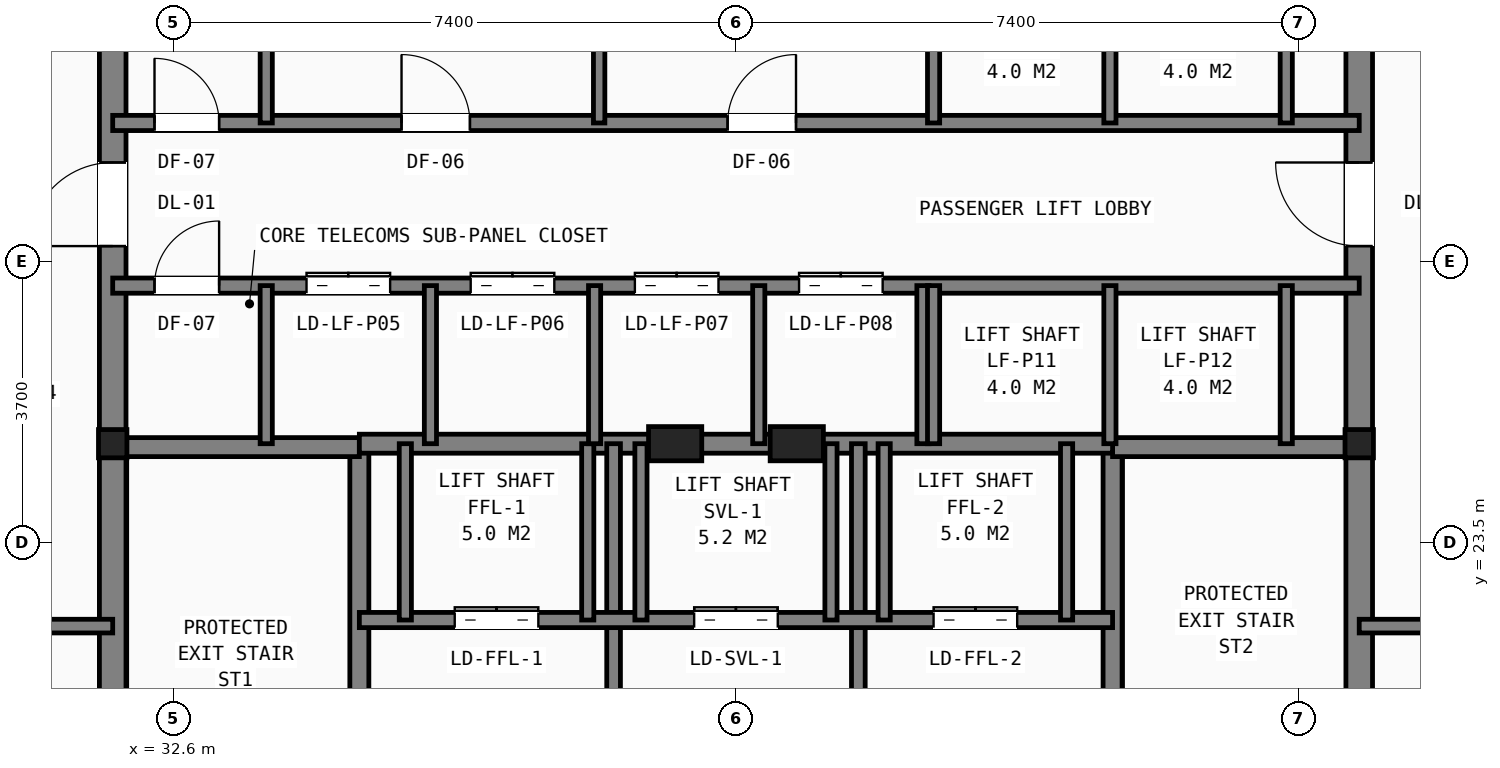
"""IFC4 building model, lengths in metres.
Left out: names, types, materials, properties, quantities, classifications, styles, units other than length and angle.
Written with IfcOpenShell. Run it as: python <this file> out.ifc"""

import sys

from ifc_helpers import new_model, si_unit, direction, frame, frame_2d, origin, origin_2d, place, context, subcontext, project, spatial, rectangle, i_section, extrude, element, fill, save


model = new_model("IFC4")
c1 = context("Model", 3, precision=1e-05, world=origin(), true_north=direction((0.0, 1.0)))
c2 = subcontext(c1, "Body", "Model", "MODEL_VIEW")
j1 = project(units=[si_unit("LENGTHUNIT", "METRE"), si_unit("PLANEANGLEUNIT", "RADIAN")], contexts=[c1])
p1 = place(None, origin())
s1 = spatial("IfcSite", under=j1, at=p1, CompositionType="ELEMENT")
p2 = place(p1, origin())
s2 = spatial("IfcBuilding", under=s1, at=p2, CompositionType="ELEMENT")
p3 = place(p2, frame((0.0, 0.0, 157.4)))
s3 = spatial("IfcBuildingStorey", under=s2, at=p3, CompositionType="ELEMENT", Elevation=157.4)
for number, where, z_axis, x_axis in (
    (1, (31.8, 24.8, 0.0), (0.0, 0.0, 1.0), (1.0, 0.0, 0.0)),
    (2, (48.2, 24.8, 0.0), (0.0, 0.0, 1.0), (1.0, 0.0, 0.0)),
):
    element("IfcColumn", number, at=place(p3, frame(where, z_axis=z_axis, x_axis=x_axis)), inside=s3, PredefinedType="COLUMN", context=c2, shape_type="SweptSolid", body=[
        extrude(i_section(OverallWidth=0.374, OverallDepth=0.372, WebThickness=0.016, FlangeThickness=0.026, at=origin_2d()), origin(), (0.0, 0.0, 1.0), 4.6),
    ])
for number, where, z_axis, x_axis in (
    (3, (39.2, 24.8, 0.0), (0.0, 0.0, 1.0), (1.0, 0.0, 0.0)),
    (4, (40.8, 24.8, 0.0), (0.0, 0.0, 1.0), (1.0, 0.0, 0.0)),
):
    element("IfcColumn", number, at=place(p3, frame(where, z_axis=z_axis, x_axis=x_axis)), inside=s3, PredefinedType="PILASTER", context=c2, shape_type="SweptSolid", body=[
        extrude(rectangle(XDim=0.7, YDim=0.45, at=origin_2d()), origin(), (0.0, 0.0, 1.0), 4.6),
    ])
p4 = place(p3, frame((31.8, 16.4, 0.0), z_axis=(0.0, 0.0, 1.0), x_axis=(0.0, 1.0, 0.0)))
e5 = element("IfcWall", 5, at=p4, inside=s3, PredefinedType="SHEAR", context=c2, shape_type="SweptSolid", body=[
    extrude(rectangle(XDim=14.8, YDim=0.35, at=frame_2d((7.4, 0.0))), origin(), (0.0, 0.0, 1.0), 4.36),
])
p5 = place(p4, frame((11.0, 0.0, 0.0)))
e6 = element("IfcOpeningElement", 6, at=p5, cuts=e5, PredefinedType="OPENING", context=c2, shape_type="SweptSolid", body=[
    extrude(rectangle(XDim=1.1, YDim=2.15, at=frame_2d((0.55, 1.075))), frame((0.0, 0.185, 0.0), z_axis=(0.0, -1.0, 0.0), x_axis=(1.0, 0.0, 0.0)), (0.0, 0.0, 1.0), 0.37),
])
p6 = place(p4, frame((0.45, 0.0, 0.0)))
e7 = element("IfcOpeningElement", 7, at=p6, cuts=e5, PredefinedType="OPENING", context=c2, shape_type="SweptSolid", body=[
    extrude(rectangle(XDim=0.95, YDim=2.1, at=frame_2d((0.475, 1.05))), frame((0.0, 0.185, 0.0), z_axis=(0.0, -1.0, 0.0), x_axis=(1.0, 0.0, 0.0)), (0.0, 0.0, 1.0), 0.37),
])
p7 = place(p3, frame((48.2, 16.4, 0.0), z_axis=(0.0, 0.0, 1.0), x_axis=(0.0, 1.0, 0.0)))
e8 = element("IfcWall", 8, at=p7, inside=s3, PredefinedType="SHEAR", context=c2, shape_type="SweptSolid", body=[
    extrude(rectangle(XDim=14.8, YDim=0.35, at=frame_2d((7.4, 0.0))), origin(), (0.0, 0.0, 1.0), 4.36),
])
p8 = place(p7, frame((11.0, 0.0, 0.0)))
e9 = element("IfcOpeningElement", 9, at=p8, cuts=e8, PredefinedType="OPENING", context=c2, shape_type="SweptSolid", body=[
    extrude(rectangle(XDim=1.1, YDim=2.15, at=frame_2d((0.55, 1.075))), frame((0.0, 0.185, 0.0), z_axis=(0.0, -1.0, 0.0), x_axis=(1.0, 0.0, 0.0)), (0.0, 0.0, 1.0), 0.37),
])
p9 = place(p7, frame((0.45, 0.0, 0.0)))
e10 = element("IfcOpeningElement", 10, at=p9, cuts=e8, PredefinedType="OPENING", context=c2, shape_type="SweptSolid", body=[
    extrude(rectangle(XDim=0.95, YDim=2.1, at=frame_2d((0.475, 1.05))), frame((0.0, 0.185, 0.0), z_axis=(0.0, -1.0, 0.0), x_axis=(1.0, 0.0, 0.0)), (0.0, 0.0, 1.0), 0.37),
])
p10 = place(p3, frame((35.045, 16.4, 0.0), z_axis=(0.0, 0.0, 1.0), x_axis=(0.0, 1.0, 0.0)))
e11 = element("IfcWall", 11, at=p10, inside=s3, PredefinedType="SHEAR", context=c2, shape_type="SweptSolid", body=[
    extrude(rectangle(XDim=8.4, YDim=0.25, at=frame_2d((4.2, 0.0))), origin(), (0.0, 0.0, 1.0), 4.36),
])
p11 = place(p10, frame((0.45, 0.0, 0.0)))
e12 = element("IfcOpeningElement", 12, at=p11, cuts=e11, PredefinedType="OPENING", context=c2, shape_type="SweptSolid", body=[
    extrude(rectangle(XDim=0.95, YDim=2.1, at=frame_2d((0.475, 1.05))), frame((0.0, 0.135, 0.0), z_axis=(0.0, -1.0, 0.0), x_axis=(1.0, 0.0, 0.0)), (0.0, 0.0, 1.0), 0.27),
])
p12 = place(p3, frame((31.8, 24.755, 0.0), z_axis=(0.0, 0.0, 1.0), x_axis=(1.0, 0.0, 0.0)))
e13 = element("IfcWall", 13, at=p12, inside=s3, PredefinedType="SHEAR", context=c2, shape_type="SweptSolid", body=[
    extrude(rectangle(XDim=3.245, YDim=0.25, at=frame_2d((1.623, 0.0))), origin(), (0.0, 0.0, 1.0), 4.36),
])
p13 = place(p3, frame((44.955, 16.4, 0.0), z_axis=(0.0, 0.0, 1.0), x_axis=(0.0, 1.0, 0.0)))
e14 = element("IfcWall", 14, at=p13, inside=s3, PredefinedType="SHEAR", context=c2, shape_type="SweptSolid", body=[
    extrude(rectangle(XDim=8.4, YDim=0.25, at=frame_2d((4.2, 0.0))), origin(), (0.0, 0.0, 1.0), 4.36),
])
p14 = place(p13, frame((0.45, 0.0, 0.0)))
e15 = element("IfcOpeningElement", 15, at=p14, cuts=e14, PredefinedType="OPENING", context=c2, shape_type="SweptSolid", body=[
    extrude(rectangle(XDim=0.95, YDim=2.1, at=frame_2d((0.475, 1.05))), frame((0.0, 0.135, 0.0), z_axis=(0.0, -1.0, 0.0), x_axis=(1.0, 0.0, 0.0)), (0.0, 0.0, 1.0), 0.27),
])
p15 = place(p3, frame((44.955, 24.755, 0.0), z_axis=(0.0, 0.0, 1.0), x_axis=(1.0, 0.0, 0.0)))
e16 = element("IfcWall", 16, at=p15, inside=s3, PredefinedType="SHEAR", context=c2, shape_type="SweptSolid", body=[
    extrude(rectangle(XDim=3.245, YDim=0.25, at=frame_2d((1.623, 0.0))), origin(), (0.0, 0.0, 1.0), 4.36),
])
p16 = place(p3, frame((35.045, 24.8, 0.0), z_axis=(0.0, 0.0, 1.0), x_axis=(1.0, 0.0, 0.0)))
e17 = element("IfcWall", 17, at=p16, inside=s3, PredefinedType="SHEAR", context=c2, shape_type="SweptSolid", body=[
    extrude(rectangle(XDim=9.91, YDim=0.25, at=frame_2d((4.955, 0.0))), origin(), (0.0, 0.0, 1.0), 4.36),
])
p17 = place(p3, frame((38.39, 16.4, 0.0), z_axis=(0.0, 0.0, 1.0), x_axis=(0.0, 1.0, 0.0)))
e18 = element("IfcWall", 18, at=p17, inside=s3, PredefinedType="PARTITIONING", context=c2, shape_type="SweptSolid", body=[
    extrude(rectangle(XDim=8.4, YDim=0.18, at=frame_2d((4.2, 0.0))), origin(), (0.0, 0.0, 1.0), 4.088),
])
p18 = place(p17, frame((3.8, 0.0, 0.0)))
e19 = element("IfcOpeningElement", 19, at=p18, cuts=e18, PredefinedType="OPENING", context=c2, shape_type="SweptSolid", body=[
    extrude(rectangle(XDim=0.95, YDim=2.1, at=frame_2d((0.475, 1.05))), frame((0.0, 0.1, 0.0), z_axis=(0.0, -1.0, 0.0), x_axis=(1.0, 0.0, 0.0)), (0.0, 0.0, 1.0), 0.2),
])
p19 = place(p3, frame((41.61, 16.4, 0.0), z_axis=(0.0, 0.0, 1.0), x_axis=(0.0, 1.0, 0.0)))
e20 = element("IfcWall", 20, at=p19, inside=s3, PredefinedType="PARTITIONING", context=c2, shape_type="SweptSolid", body=[
    extrude(rectangle(XDim=8.4, YDim=0.18, at=frame_2d((4.2, 0.0))), origin(), (0.0, 0.0, 1.0), 4.088),
])
p20 = place(p3, frame((35.045, 22.48, 0.0), z_axis=(0.0, 0.0, 1.0), x_axis=(1.0, 0.0, 0.0)))
e21 = element("IfcWall", 21, at=p20, inside=s3, PredefinedType="SOLIDWALL", context=c2, shape_type="SweptSolid", body=[
    extrude(rectangle(XDim=9.91, YDim=0.2, at=frame_2d((4.955, 0.0))), origin(), (0.0, 0.0, 1.0), 4.36),
])
p21 = place(p20, frame((1.255, 0.0, 0.0)))
e22 = element("IfcOpeningElement", 22, at=p21, cuts=e21, PredefinedType="OPENING", context=c2, shape_type="SweptSolid", body=[
    extrude(rectangle(XDim=1.1, YDim=2.15, at=frame_2d((0.55, 1.075))), frame((0.0, 0.11, 0.0), z_axis=(0.0, -1.0, 0.0), x_axis=(1.0, 0.0, 0.0)), (0.0, 0.0, 1.0), 0.22),
])
p22 = place(p20, frame((7.555, 0.0, 0.0)))
e23 = element("IfcOpeningElement", 23, at=p22, cuts=e21, PredefinedType="OPENING", context=c2, shape_type="SweptSolid", body=[
    extrude(rectangle(XDim=1.1, YDim=2.15, at=frame_2d((0.55, 1.075))), frame((0.0, 0.11, 0.0), z_axis=(0.0, -1.0, 0.0), x_axis=(1.0, 0.0, 0.0)), (0.0, 0.0, 1.0), 0.22),
])
p23 = place(p20, frame((4.405, 0.0, 0.0)))
e24 = element("IfcOpeningElement", 24, at=p23, cuts=e21, PredefinedType="OPENING", context=c2, shape_type="SweptSolid", body=[
    extrude(rectangle(XDim=1.1, YDim=2.15, at=frame_2d((0.55, 1.075))), frame((0.0, 0.11, 0.0), z_axis=(0.0, -1.0, 0.0), x_axis=(1.0, 0.0, 0.0)), (0.0, 0.0, 1.0), 0.22),
])
for number, where, z_axis, x_axis in (
    (25, (35.65, 22.48, 0.0), (0.0, 0.0, 1.0), (0.0, 1.0, 0.0)),
    (26, (38.05, 22.48, 0.0), (0.0, 0.0, 1.0), (0.0, 1.0, 0.0)),
    (27, (41.95, 22.48, 0.0), (0.0, 0.0, 1.0), (0.0, 1.0, 0.0)),
    (28, (44.35, 22.48, 0.0), (0.0, 0.0, 1.0), (0.0, 1.0, 0.0)),
    (29, (38.75, 22.48, 0.0), (0.0, 0.0, 1.0), (0.0, 1.0, 0.0)),
    (30, (41.25, 22.48, 0.0), (0.0, 0.0, 1.0), (0.0, 1.0, 0.0)),
):
    element("IfcWall", number, at=place(p3, frame(where, z_axis=z_axis, x_axis=x_axis)), inside=s3, PredefinedType="SOLIDWALL", context=c2, shape_type="SweptSolid", body=[
        extrude(rectangle(XDim=2.32, YDim=0.16, at=frame_2d((1.16, 0.0))), origin(), (0.0, 0.0, 1.0), 4.36),
    ])
p24 = place(p3, frame((31.8, 29.02, 0.0), z_axis=(0.0, 0.0, 1.0), x_axis=(1.0, 0.0, 0.0)))
e31 = element("IfcWall", 31, at=p24, inside=s3, PredefinedType="SOLIDWALL", context=c2, shape_type="SweptSolid", body=[
    extrude(rectangle(XDim=16.4, YDim=0.2, at=frame_2d((8.2, 0.0))), origin(), (0.0, 0.0, 1.0), 3.811),
])
p25 = place(p24, frame((0.55, 0.0, 0.0)))
e32 = element("IfcOpeningElement", 32, at=p25, cuts=e31, PredefinedType="OPENING", context=c2, shape_type="SweptSolid", body=[
    extrude(rectangle(XDim=0.85, YDim=2.05, at=frame_2d((0.425, 1.025))), frame((0.0, 0.11, 0.0), z_axis=(0.0, -1.0, 0.0), x_axis=(1.0, 0.0, 0.0)), (0.0, 0.0, 1.0), 0.22),
])
p26 = place(p24, frame((3.8, 0.0, 0.0)))
e33 = element("IfcOpeningElement", 33, at=p26, cuts=e31, PredefinedType="OPENING", context=c2, shape_type="SweptSolid", body=[
    extrude(rectangle(XDim=0.9, YDim=2.1, at=frame_2d((0.45, 1.05))), frame((0.0, 0.11, 0.0), z_axis=(0.0, -1.0, 0.0), x_axis=(1.0, 0.0, 0.0)), (0.0, 0.0, 1.0), 0.22),
])
p27 = place(p24, frame((8.09, 0.0, 0.0)))
e34 = element("IfcOpeningElement", 34, at=p27, cuts=e31, PredefinedType="OPENING", context=c2, shape_type="SweptSolid", body=[
    extrude(rectangle(XDim=0.9, YDim=2.1, at=frame_2d((0.45, 1.05))), frame((0.0, 0.11, 0.0), z_axis=(0.0, -1.0, 0.0), x_axis=(1.0, 0.0, 0.0)), (0.0, 0.0, 1.0), 0.22),
])
p28 = place(p3, frame((31.8, 26.88, 0.0), z_axis=(0.0, 0.0, 1.0), x_axis=(1.0, 0.0, 0.0)))
e35 = element("IfcWall", 35, at=p28, inside=s3, PredefinedType="SOLIDWALL", context=c2, shape_type="SweptSolid", body=[
    extrude(rectangle(XDim=16.4, YDim=0.2, at=frame_2d((8.2, 0.0))), origin(), (0.0, 0.0, 1.0), 3.811),
])
p29 = place(p28, frame((0.55, 0.0, 0.0)))
e36 = element("IfcOpeningElement", 36, at=p29, cuts=e35, PredefinedType="OPENING", context=c2, shape_type="SweptSolid", body=[
    extrude(rectangle(XDim=0.85, YDim=2.05, at=frame_2d((0.425, 1.025))), frame((0.0, 0.11, 0.0), z_axis=(0.0, -1.0, 0.0), x_axis=(1.0, 0.0, 0.0)), (0.0, 0.0, 1.0), 0.22),
])
p30 = place(p28, frame((2.55, 0.0, 0.0)))
e37 = element("IfcOpeningElement", 37, at=p30, cuts=e35, PredefinedType="OPENING", context=c2, shape_type="SweptSolid", body=[
    extrude(rectangle(XDim=1.1, YDim=2.15, at=frame_2d((0.55, 1.075))), frame((0.0, 0.11, 0.0), z_axis=(0.0, -1.0, 0.0), x_axis=(1.0, 0.0, 0.0)), (0.0, 0.0, 1.0), 0.22),
])
p31 = place(p28, frame((4.71, 0.0, 0.0)))
e38 = element("IfcOpeningElement", 38, at=p31, cuts=e35, PredefinedType="OPENING", context=c2, shape_type="SweptSolid", body=[
    extrude(rectangle(XDim=1.1, YDim=2.15, at=frame_2d((0.55, 1.075))), frame((0.0, 0.11, 0.0), z_axis=(0.0, -1.0, 0.0), x_axis=(1.0, 0.0, 0.0)), (0.0, 0.0, 1.0), 0.22),
])
p32 = place(p28, frame((6.87, 0.0, 0.0)))
e39 = element("IfcOpeningElement", 39, at=p32, cuts=e35, PredefinedType="OPENING", context=c2, shape_type="SweptSolid", body=[
    extrude(rectangle(XDim=1.1, YDim=2.15, at=frame_2d((0.55, 1.075))), frame((0.0, 0.11, 0.0), z_axis=(0.0, -1.0, 0.0), x_axis=(1.0, 0.0, 0.0)), (0.0, 0.0, 1.0), 0.22),
])
p33 = place(p28, frame((9.03, 0.0, 0.0)))
e40 = element("IfcOpeningElement", 40, at=p33, cuts=e35, PredefinedType="OPENING", context=c2, shape_type="SweptSolid", body=[
    extrude(rectangle(XDim=1.1, YDim=2.15, at=frame_2d((0.55, 1.075))), frame((0.0, 0.11, 0.0), z_axis=(0.0, -1.0, 0.0), x_axis=(1.0, 0.0, 0.0)), (0.0, 0.0, 1.0), 0.22),
])
p34 = place(p3, frame((33.82, 29.02, 0.0), z_axis=(0.0, 0.0, 1.0), x_axis=(0.0, 1.0, 0.0)))
e41 = element("IfcWall", 41, at=p34, inside=s3, PredefinedType="SOLIDWALL", context=c2, shape_type="SweptSolid", body=[
    extrude(rectangle(XDim=2.18, YDim=0.16, at=frame_2d((1.09, 0.0))), origin(), (0.0, 0.0, 1.0), 4.088),
])
p35 = place(p3, frame((33.82, 24.8, 0.0), z_axis=(0.0, 0.0, 1.0), x_axis=(0.0, 1.0, 0.0)))
e42 = element("IfcWall", 42, at=p35, inside=s3, PredefinedType="SOLIDWALL", context=c2, shape_type="SweptSolid", body=[
    extrude(rectangle(XDim=2.08, YDim=0.16, at=frame_2d((1.04, 0.0))), origin(), (0.0, 0.0, 1.0), 4.36),
])
p36 = place(p3, frame((38.2, 29.02, 0.0), z_axis=(0.0, 0.0, 1.0), x_axis=(0.0, 1.0, 0.0)))
e43 = element("IfcWall", 43, at=p36, inside=s3, PredefinedType="PARTITIONING", context=c2, shape_type="SweptSolid", body=[
    extrude(rectangle(XDim=2.18, YDim=0.15, at=frame_2d((1.09, 0.0))), origin(), (0.0, 0.0, 1.0), 4.088),
])
for number, where, z_axis, x_axis in (
    (44, (35.98, 24.8, 0.0), (0.0, 0.0, 1.0), (0.0, 1.0, 0.0)),
    (45, (38.14, 24.8, 0.0), (0.0, 0.0, 1.0), (0.0, 1.0, 0.0)),
    (46, (40.3, 24.8, 0.0), (0.0, 0.0, 1.0), (0.0, 1.0, 0.0)),
    (47, (42.46, 24.8, 0.0), (0.0, 0.0, 1.0), (0.0, 1.0, 0.0)),
):
    element("IfcWall", number, at=place(p3, frame(where, z_axis=z_axis, x_axis=x_axis)), inside=s3, PredefinedType="SOLIDWALL", context=c2, shape_type="SweptSolid", body=[
        extrude(rectangle(XDim=2.08, YDim=0.16, at=frame_2d((1.04, 0.0))), origin(), (0.0, 0.0, 1.0), 4.36),
    ])
for number, where, z_axis, x_axis in (
    (48, (42.6, 29.02, 0.0), (0.0, 0.0, 1.0), (0.0, 1.0, 0.0)),
    (49, (44.92, 29.02, 0.0), (0.0, 0.0, 1.0), (0.0, 1.0, 0.0)),
    (50, (47.24, 29.02, 0.0), (0.0, 0.0, 1.0), (0.0, 1.0, 0.0)),
):
    element("IfcWall", number, at=place(p3, frame(where, z_axis=z_axis, x_axis=x_axis)), inside=s3, PredefinedType="SOLIDWALL", context=c2, shape_type="SweptSolid", body=[
        extrude(rectangle(XDim=2.18, YDim=0.16, at=frame_2d((1.09, 0.0))), origin(), (0.0, 0.0, 1.0), 4.088),
    ])
for number, where, z_axis, x_axis in (
    (51, (42.6, 24.8, 0.0), (0.0, 0.0, 1.0), (0.0, 1.0, 0.0)),
    (52, (44.92, 24.8, 0.0), (0.0, 0.0, 1.0), (0.0, 1.0, 0.0)),
    (53, (47.24, 24.8, 0.0), (0.0, 0.0, 1.0), (0.0, 1.0, 0.0)),
):
    element("IfcWall", number, at=place(p3, frame(where, z_axis=z_axis, x_axis=x_axis)), inside=s3, PredefinedType="SOLIDWALL", context=c2, shape_type="SweptSolid", body=[
        extrude(rectangle(XDim=2.08, YDim=0.16, at=frame_2d((1.04, 0.0))), origin(), (0.0, 0.0, 1.0), 4.36),
    ])
p37 = place(p3, frame((25.8, 22.4, 0.0), z_axis=(0.0, 0.0, 1.0), x_axis=(1.0, 0.0, 0.0)))
e54 = element("IfcWall", 54, at=p37, inside=s3, PredefinedType="PARTITIONING", context=c2, shape_type="SweptSolid", body=[
    extrude(rectangle(XDim=6.0, YDim=0.18, at=frame_2d((3.0, 0.0))), origin(), (0.0, 0.0, 1.0), 3.811),
])
p38 = place(p37, frame((1.6, 0.0, 0.0)))
e55 = element("IfcOpeningElement", 55, at=p38, cuts=e54, PredefinedType="OPENING", context=c2, shape_type="SweptSolid", body=[
    extrude(rectangle(XDim=1.0, YDim=2.15, at=frame_2d((0.5, 1.075))), frame((0.0, 0.1, 0.0), z_axis=(0.0, -1.0, 0.0), x_axis=(1.0, 0.0, 0.0)), (0.0, 0.0, 1.0), 0.2),
])
p39 = place(p3, frame((48.2, 22.4, 0.0), z_axis=(0.0, 0.0, 1.0), x_axis=(1.0, 0.0, 0.0)))
e56 = element("IfcWall", 56, at=p39, inside=s3, PredefinedType="PARTITIONING", context=c2, shape_type="SweptSolid", body=[
    extrude(rectangle(XDim=6.0, YDim=0.18, at=frame_2d((3.0, 0.0))), origin(), (0.0, 0.0, 1.0), 3.811),
])
p40 = place(p39, frame((1.6, 0.0, 0.0)))
e57 = element("IfcOpeningElement", 57, at=p40, cuts=e56, PredefinedType="OPENING", context=c2, shape_type="SweptSolid", body=[
    extrude(rectangle(XDim=1.0, YDim=2.15, at=frame_2d((0.5, 1.075))), frame((0.0, 0.1, 0.0), z_axis=(0.0, -1.0, 0.0), x_axis=(1.0, 0.0, 0.0)), (0.0, 0.0, 1.0), 0.2),
])
p41 = place(p21, origin())
e58 = element("IfcDoor", 58, at=p41, inside=s3, OperationType="DOUBLE_DOOR_SLIDING", PredefinedType="DOOR", context=c2, shape_type="SweptSolid", body=[
    extrude(rectangle(XDim=1.1, YDim=2.15, at=frame_2d((0.55, 1.075))), frame((0.0, 0.025, 0.0), z_axis=(0.0, -1.0, 0.0), x_axis=(1.0, 0.0, 0.0)), (0.0, 0.0, 1.0), 0.05),
])
fill(e22, e58)
p42 = place(p22, origin())
e59 = element("IfcDoor", 59, at=p42, inside=s3, OperationType="DOUBLE_DOOR_SLIDING", PredefinedType="DOOR", context=c2, shape_type="SweptSolid", body=[
    extrude(rectangle(XDim=1.1, YDim=2.15, at=frame_2d((0.55, 1.075))), frame((0.0, 0.025, 0.0), z_axis=(0.0, -1.0, 0.0), x_axis=(1.0, 0.0, 0.0)), (0.0, 0.0, 1.0), 0.05),
])
fill(e23, e59)
p43 = place(p23, origin())
e60 = element("IfcDoor", 60, at=p43, inside=s3, OperationType="DOUBLE_DOOR_SLIDING", PredefinedType="DOOR", context=c2, shape_type="SweptSolid", body=[
    extrude(rectangle(XDim=1.1, YDim=2.15, at=frame_2d((0.55, 1.075))), frame((0.0, 0.025, 0.0), z_axis=(0.0, -1.0, 0.0), x_axis=(1.0, 0.0, 0.0)), (0.0, 0.0, 1.0), 0.05),
])
fill(e24, e60)
p44 = place(p25, origin())
e61 = element("IfcDoor", 61, at=p44, inside=s3, OperationType="SINGLE_SWING_LEFT", PredefinedType="DOOR", context=c2, shape_type="SweptSolid", body=[
    extrude(rectangle(XDim=0.85, YDim=2.05, at=frame_2d((0.425, 1.025))), frame((0.0, 0.025, 0.0), z_axis=(0.0, -1.0, 0.0), x_axis=(1.0, 0.0, 0.0)), (0.0, 0.0, 1.0), 0.05),
])
fill(e32, e61)
p45 = place(p29, origin())
e62 = element("IfcDoor", 62, at=p45, inside=s3, OperationType="SINGLE_SWING_RIGHT", PredefinedType="DOOR", context=c2, shape_type="SweptSolid", body=[
    extrude(rectangle(XDim=0.85, YDim=2.05, at=frame_2d((0.425, 1.025))), frame((0.0, 0.025, 0.0), z_axis=(0.0, -1.0, 0.0), x_axis=(1.0, 0.0, 0.0)), (0.0, 0.0, 1.0), 0.05),
])
fill(e36, e62)
p46 = place(p5, origin())
e63 = element("IfcDoor", 63, at=p46, inside=s3, OperationType="SINGLE_SWING_LEFT", PredefinedType="DOOR", context=c2, shape_type="SweptSolid", body=[
    extrude(rectangle(XDim=1.1, YDim=2.15, at=frame_2d((0.55, 1.075))), frame((0.0, 0.025, 0.0), z_axis=(0.0, -1.0, 0.0), x_axis=(1.0, 0.0, 0.0)), (0.0, 0.0, 1.0), 0.05),
])
fill(e6, e63)
p47 = place(p8, origin())
e64 = element("IfcDoor", 64, at=p47, inside=s3, OperationType="SINGLE_SWING_RIGHT", PredefinedType="DOOR", context=c2, shape_type="SweptSolid", body=[
    extrude(rectangle(XDim=1.1, YDim=2.15, at=frame_2d((0.55, 1.075))), frame((0.0, 0.025, 0.0), z_axis=(0.0, -1.0, 0.0), x_axis=(1.0, 0.0, 0.0)), (0.0, 0.0, 1.0), 0.05),
])
fill(e9, e64)
p48 = place(p26, origin())
e65 = element("IfcDoor", 65, at=p48, inside=s3, OperationType="SINGLE_SWING_LEFT", PredefinedType="DOOR", context=c2, shape_type="SweptSolid", body=[
    extrude(rectangle(XDim=0.9, YDim=2.1, at=frame_2d((0.45, 1.05))), frame((0.0, 0.025, 0.0), z_axis=(0.0, -1.0, 0.0), x_axis=(1.0, 0.0, 0.0)), (0.0, 0.0, 1.0), 0.05),
])
fill(e33, e65)
p49 = place(p27, origin())
e66 = element("IfcDoor", 66, at=p49, inside=s3, OperationType="SINGLE_SWING_RIGHT", PredefinedType="DOOR", context=c2, shape_type="SweptSolid", body=[
    extrude(rectangle(XDim=0.9, YDim=2.1, at=frame_2d((0.45, 1.05))), frame((0.0, 0.025, 0.0), z_axis=(0.0, -1.0, 0.0), x_axis=(1.0, 0.0, 0.0)), (0.0, 0.0, 1.0), 0.05),
])
fill(e34, e66)
p50 = place(p30, origin())
e67 = element("IfcDoor", 67, at=p50, inside=s3, OperationType="DOUBLE_DOOR_SLIDING", PredefinedType="DOOR", context=c2, shape_type="SweptSolid", body=[
    extrude(rectangle(XDim=1.1, YDim=2.15, at=frame_2d((0.55, 1.075))), frame((0.0, 0.025, 0.0), z_axis=(0.0, -1.0, 0.0), x_axis=(1.0, 0.0, 0.0)), (0.0, 0.0, 1.0), 0.05),
])
fill(e37, e67)
p51 = place(p31, origin())
e68 = element("IfcDoor", 68, at=p51, inside=s3, OperationType="DOUBLE_DOOR_SLIDING", PredefinedType="DOOR", context=c2, shape_type="SweptSolid", body=[
    extrude(rectangle(XDim=1.1, YDim=2.15, at=frame_2d((0.55, 1.075))), frame((0.0, 0.025, 0.0), z_axis=(0.0, -1.0, 0.0), x_axis=(1.0, 0.0, 0.0)), (0.0, 0.0, 1.0), 0.05),
])
fill(e38, e68)
p52 = place(p32, origin())
e69 = element("IfcDoor", 69, at=p52, inside=s3, OperationType="DOUBLE_DOOR_SLIDING", PredefinedType="DOOR", context=c2, shape_type="SweptSolid", body=[
    extrude(rectangle(XDim=1.1, YDim=2.15, at=frame_2d((0.55, 1.075))), frame((0.0, 0.025, 0.0), z_axis=(0.0, -1.0, 0.0), x_axis=(1.0, 0.0, 0.0)), (0.0, 0.0, 1.0), 0.05),
])
fill(e39, e69)
p53 = place(p33, origin())
e70 = element("IfcDoor", 70, at=p53, inside=s3, OperationType="DOUBLE_DOOR_SLIDING", PredefinedType="DOOR", context=c2, shape_type="SweptSolid", body=[
    extrude(rectangle(XDim=1.1, YDim=2.15, at=frame_2d((0.55, 1.075))), frame((0.0, 0.025, 0.0), z_axis=(0.0, -1.0, 0.0), x_axis=(1.0, 0.0, 0.0)), (0.0, 0.0, 1.0), 0.05),
])
fill(e40, e70)
save(model, sys.argv[1])
